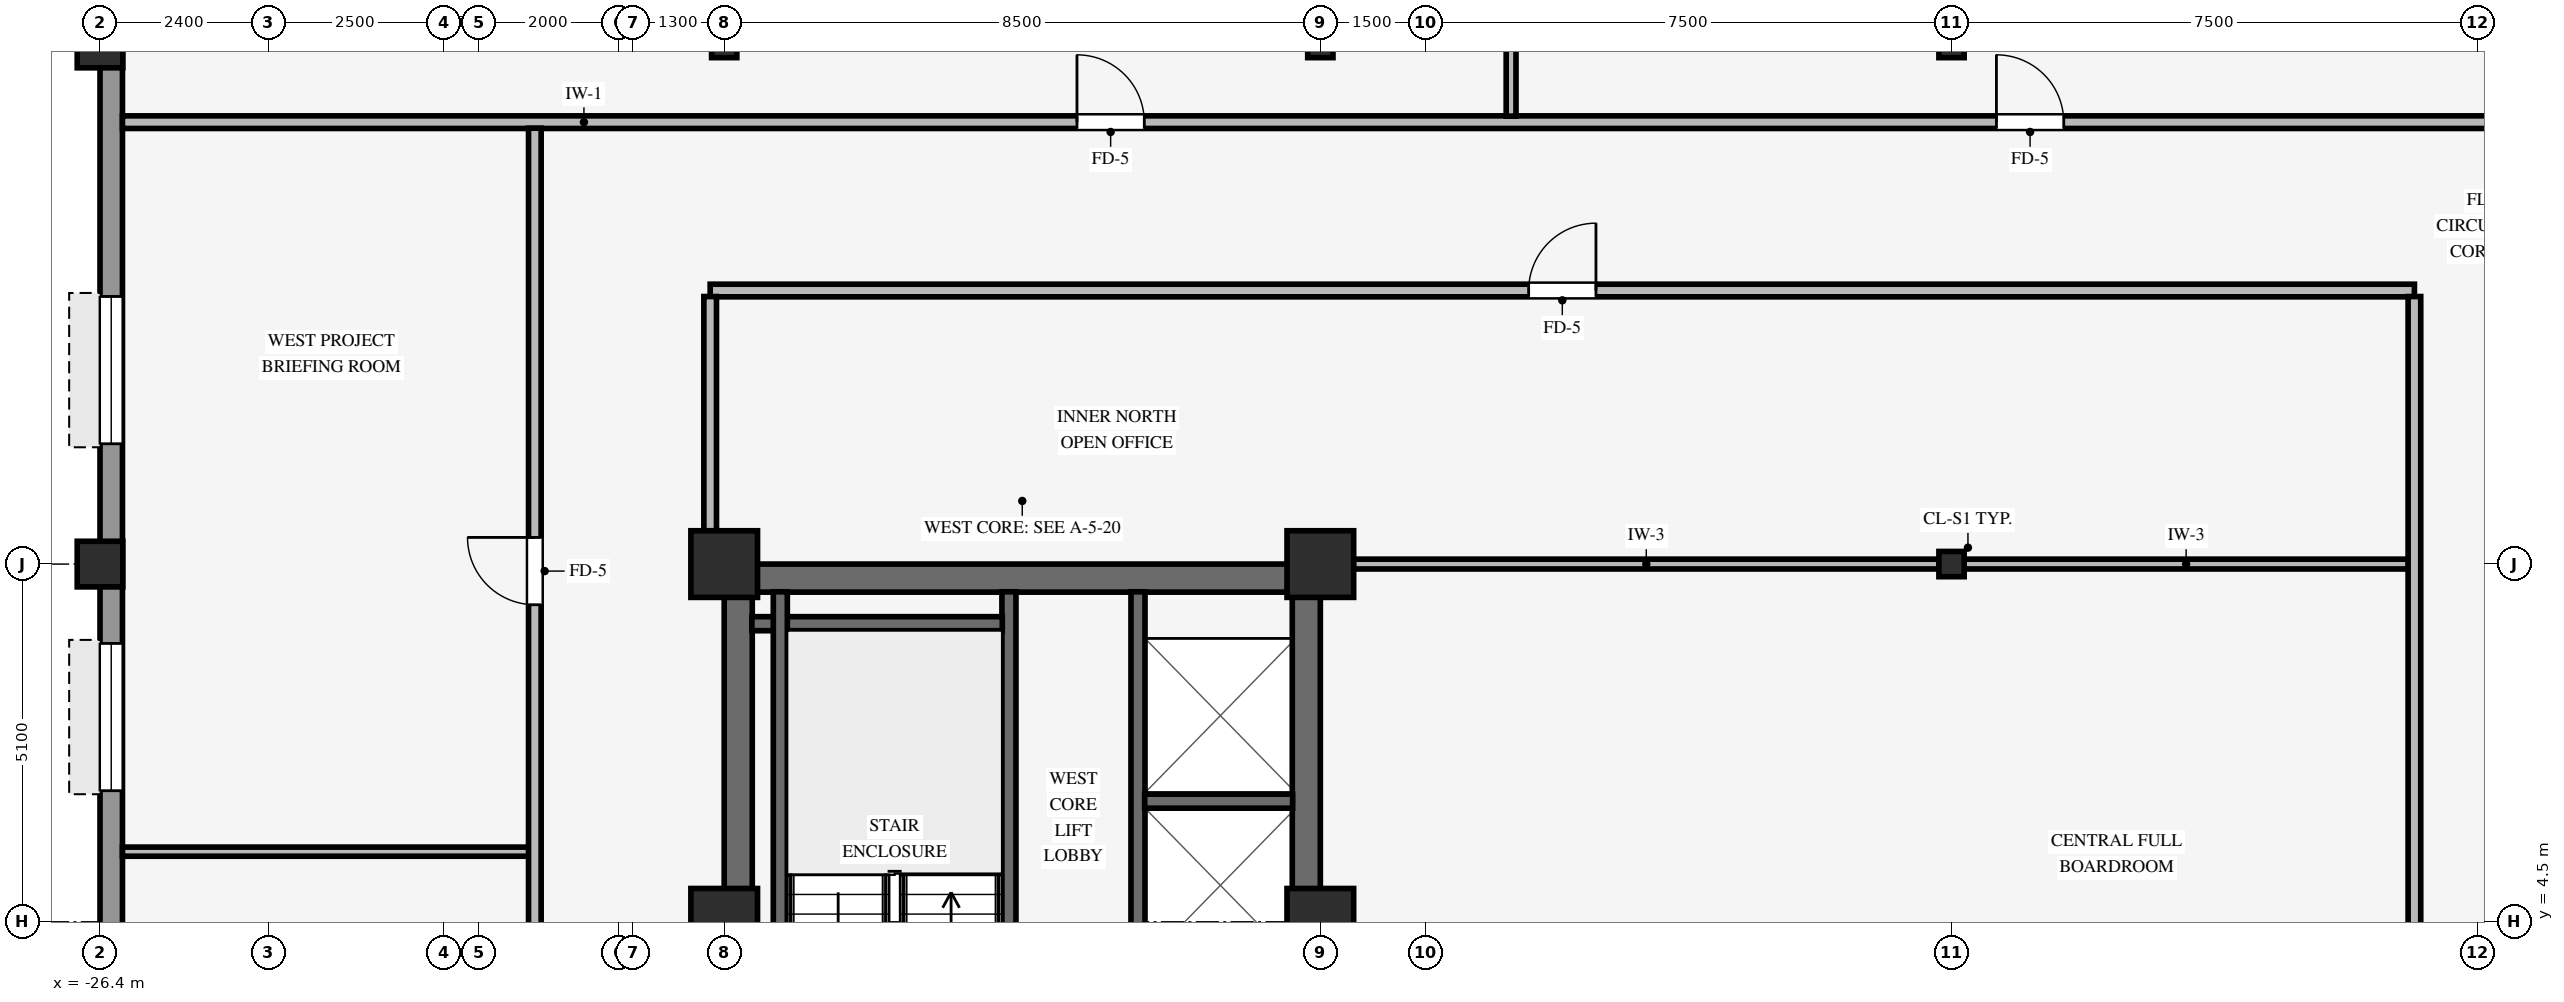
"""IFC4 building model, lengths in metres.
Left out: names, types, materials, properties, quantities, classifications, styles, units other than length and angle.
Written with IfcOpenShell. Run it as: python <this file> out.ifc"""

import sys

from ifc_helpers import new_model, si_unit, direction, frame, frame_2d, origin, origin_2d, place, context, subcontext, project, spatial, rectangle, hollow_rectangle, i_section, extrude, source, transform, mapped, element, fill, save


model = new_model("IFC4")
c1 = context("Model", 3, precision=1e-05, world=origin(), true_north=direction((0.0, 1.0)))
c2 = subcontext(c1, "Body", "Model", "MODEL_VIEW")
j1 = project(units=[si_unit("LENGTHUNIT", "METRE"), si_unit("PLANEANGLEUNIT", "RADIAN")], contexts=[c1])
p1 = place(None, origin())
s1 = spatial("IfcSite", under=j1, at=p1, CompositionType="ELEMENT")
p2 = place(p1, origin())
s2 = spatial("IfcBuilding", under=s1, at=p2, CompositionType="ELEMENT")
p3 = place(p2, frame((0.0, 0.0, 153.05)))
s3 = spatial("IfcBuildingStorey", under=s2, at=p3, CompositionType="ELEMENT", Elevation=153.05)
p4 = place(p3, frame((-17.5, 9.4, 0.0), z_axis=(0.0, 0.0, 1.0), x_axis=(1.0, 0.0, 0.0)))
e1 = element("IfcWall", 1, at=p4, inside=s3, PredefinedType="SHEAR", context=c2, shape_type="SweptSolid", body=[
    extrude(rectangle(XDim=8.5, YDim=0.4, at=frame_2d((4.25, 0.0))), origin(), (0.0, 0.0, 1.0), 3.37),
])
p5 = place(p3, frame((-17.3, -9.205, 0.0), z_axis=(0.0, 0.0, 1.0), x_axis=(0.0, 1.0, 0.0)))
e2 = element("IfcWall", 2, at=p5, inside=s3, PredefinedType="SHEAR", context=c2, shape_type="SweptSolid", body=[
    extrude(rectangle(XDim=18.41, YDim=0.4, at=frame_2d((9.205, 0.0))), origin(), (0.0, 0.0, 1.0), 3.37),
])
p6 = place(p3, frame((-9.2, -9.205, 0.0), z_axis=(0.0, 0.0, 1.0), x_axis=(0.0, 1.0, 0.0)))
e3 = element("IfcWall", 3, at=p6, inside=s3, PredefinedType="SHEAR", context=c2, shape_type="SweptSolid", body=[
    extrude(rectangle(XDim=18.41, YDim=0.4, at=frame_2d((9.205, 0.0))), origin(), (0.0, 0.0, 1.0), 3.37),
])
p7 = place(p6, frame((8.605, 0.0, 0.0)))
e4 = element("IfcOpeningElement", 4, at=p7, cuts=e3, PredefinedType="OPENING", context=c2, shape_type="SweptSolid", body=[
    extrude(rectangle(XDim=1.2, YDim=2.15, at=frame_2d((0.6, 1.075))), frame((0.0, 0.21, 0.0), z_axis=(0.0, -1.0, 0.0), x_axis=(1.0, 0.0, 0.0)), (0.0, 0.0, 1.0), 0.42),
])
for number, where, z_axis, x_axis in (
    (5, (-17.5, 4.5, 0.0), (0.0, 0.0, 1.0), (1.0, 0.0, 0.0)),
    (6, (-17.5, 9.6, 0.0), (0.0, 0.0, 1.0), (1.0, 0.0, 0.0)),
    (7, (-9.0, 4.5, 0.0), (0.0, 0.0, 1.0), (1.0, 0.0, 0.0)),
    (8, (-9.0, 9.6, 0.0), (0.0, 0.0, 1.0), (1.0, 0.0, 0.0)),
):
    element("IfcColumn", number, at=place(p3, frame(where, z_axis=z_axis, x_axis=x_axis)), inside=s3, PredefinedType="COLUMN", context=c2, shape_type="SweptSolid", body=[
        extrude(rectangle(XDim=0.95, YDim=0.95, at=origin_2d()), origin(), (0.0, 0.0, 1.0), 3.37),
    ])
for number, where, z_axis, x_axis in (
    (9, (-26.4, 9.6, 0.0), (0.0, 0.0, 1.0), (1.0, 0.0, 0.0)),
    (10, (-26.4, 17.0, 0.0), (0.0, 0.0, 1.0), (1.0, 0.0, 0.0)),
):
    element("IfcColumn", number, at=place(p3, frame(where, z_axis=z_axis, x_axis=x_axis)), inside=s3, PredefinedType="COLUMN", context=c2, shape_type="SweptSolid", body=[
        extrude(hollow_rectangle(XDim=0.65, YDim=0.65, WallThickness=0.04, InnerFilletRadius=0.04, OuterFilletRadius=0.08, at=origin_2d()), origin(), (0.0, 0.0, 1.0), 3.37),
    ])
for number, where, z_axis, x_axis in (
    (11, (0.0, 9.6, 0.0), (0.0, 0.0, 1.0), (1.0, 0.0, 0.0)),
    (12, (0.0, 17.0, 0.0), (0.0, 0.0, 1.0), (1.0, 0.0, 0.0)),
    (13, (-17.5, 17.0, 0.0), (0.0, 0.0, 1.0), (1.0, 0.0, 0.0)),
    (14, (-9.0, 17.0, 0.0), (0.0, 0.0, 1.0), (1.0, 0.0, 0.0)),
):
    element("IfcColumn", number, at=place(p3, frame(where, z_axis=z_axis, x_axis=x_axis)), inside=s3, PredefinedType="COLUMN", context=c2, shape_type="SweptSolid", body=[
        extrude(i_section(OverallWidth=0.36, OverallDepth=0.36, WebThickness=0.021, FlangeThickness=0.021, FilletRadius=0.018, at=origin_2d()), origin(), (0.0, 0.0, 1.0), 3.37),
    ])
p8 = place(p3, frame((-26.24, -20.784, 0.0), z_axis=(0.0, 0.0, 1.0), x_axis=(0.0, 1.0, 0.0)))
e15 = element("IfcWall", 15, at=p8, inside=s3, PredefinedType="STANDARD", context=c2, shape_type="SweptSolid", body=[
    extrude(rectangle(XDim=41.568, YDim=0.32, at=frame_2d((20.784, 0.0))), origin(), (0.0, 0.0, 1.0), 2.705),
])
p9 = place(p8, frame((7.369, 0.0, 0.8)))
e16 = element("IfcOpeningElement", 16, at=p9, cuts=e15, PredefinedType="OPENING", context=c2, shape_type="SweptSolid", body=[
    extrude(rectangle(XDim=2.1, YDim=1.56, at=frame_2d((1.05, 0.78))), frame((0.0, 0.17, 0.0), z_axis=(0.0, -1.0, 0.0), x_axis=(1.0, 0.0, 0.0)), (0.0, 0.0, 1.0), 0.34),
])
p10 = place(p8, frame((12.315, 0.0, 0.8)))
e17 = element("IfcOpeningElement", 17, at=p10, cuts=e15, PredefinedType="OPENING", context=c2, shape_type="SweptSolid", body=[
    extrude(rectangle(XDim=2.1, YDim=1.56, at=frame_2d((1.05, 0.78))), frame((0.0, 0.17, 0.0), z_axis=(0.0, -1.0, 0.0), x_axis=(1.0, 0.0, 0.0)), (0.0, 0.0, 1.0), 0.34),
])
p11 = place(p8, frame((17.261, 0.0, 0.8)))
e18 = element("IfcOpeningElement", 18, at=p11, cuts=e15, PredefinedType="OPENING", context=c2, shape_type="SweptSolid", body=[
    extrude(rectangle(XDim=2.1, YDim=1.56, at=frame_2d((1.05, 0.78))), frame((0.0, 0.17, 0.0), z_axis=(0.0, -1.0, 0.0), x_axis=(1.0, 0.0, 0.0)), (0.0, 0.0, 1.0), 0.34),
])
p12 = place(p8, frame((22.207, 0.0, 0.8)))
e19 = element("IfcOpeningElement", 19, at=p12, cuts=e15, PredefinedType="OPENING", context=c2, shape_type="SweptSolid", body=[
    extrude(rectangle(XDim=2.1, YDim=1.56, at=frame_2d((1.05, 0.78))), frame((0.0, 0.17, 0.0), z_axis=(0.0, -1.0, 0.0), x_axis=(1.0, 0.0, 0.0)), (0.0, 0.0, 1.0), 0.34),
])
p13 = place(p8, frame((27.153, 0.0, 0.8)))
e20 = element("IfcOpeningElement", 20, at=p13, cuts=e15, PredefinedType="OPENING", context=c2, shape_type="SweptSolid", body=[
    extrude(rectangle(XDim=2.1, YDim=1.56, at=frame_2d((1.05, 0.78))), frame((0.0, 0.17, 0.0), z_axis=(0.0, -1.0, 0.0), x_axis=(1.0, 0.0, 0.0)), (0.0, 0.0, 1.0), 0.34),
])
p14 = place(p8, frame((32.099, 0.0, 0.8)))
e21 = element("IfcOpeningElement", 21, at=p14, cuts=e15, PredefinedType="OPENING", context=c2, shape_type="SweptSolid", body=[
    extrude(rectangle(XDim=2.1, YDim=1.56, at=frame_2d((1.05, 0.78))), frame((0.0, 0.17, 0.0), z_axis=(0.0, -1.0, 0.0), x_axis=(1.0, 0.0, 0.0)), (0.0, 0.0, 1.0), 0.34),
])
p15 = place(p3, frame((-13.44, 0.9, 0.0), z_axis=(0.0, 0.0, 1.0), x_axis=(0.0, 1.0, 0.0)))
e22 = element("IfcWall", 22, at=p15, inside=s3, PredefinedType="SHEAR", context=c2, shape_type="SweptSolid", body=[
    extrude(rectangle(XDim=8.305, YDim=0.2, at=frame_2d((4.153, 0.0))), origin(), (0.0, 0.0, 1.0), 3.37),
])
p16 = place(p15, frame((1.53, 0.0, 0.0), z_axis=(0.0, 0.0, 1.0), x_axis=(-1.0, 0.0, 0.0)))
e23 = element("IfcOpeningElement", 23, at=p16, cuts=e22, PredefinedType="OPENING", context=c2, shape_type="SweptSolid", body=[
    extrude(rectangle(XDim=1.1, YDim=2.15, at=frame_2d((0.55, 1.075))), frame((0.0, 0.11, 0.0), z_axis=(0.0, -1.0, 0.0), x_axis=(1.0, 0.0, 0.0)), (0.0, 0.0, 1.0), 0.22),
])
p17 = place(p3, frame((-17.105, 8.75, 0.0), z_axis=(0.0, 0.0, 1.0), x_axis=(1.0, 0.0, 0.0)))
e24 = element("IfcWall", 24, at=p17, inside=s3, PredefinedType="SHEAR", context=c2, shape_type="SweptSolid", body=[
    extrude(rectangle(XDim=3.57, YDim=0.2, at=frame_2d((1.785, 0.0))), origin(), (0.0, 0.0, 1.0), 3.37),
])
p18 = place(p3, frame((-16.7, 1.095, 0.0), z_axis=(0.0, 0.0, 1.0), x_axis=(0.0, 1.0, 0.0)))
e25 = element("IfcWall", 25, at=p18, inside=s3, PredefinedType="SHEAR", context=c2, shape_type="SweptSolid", body=[
    extrude(rectangle(XDim=8.11, YDim=0.2, at=frame_2d((4.055, 0.0))), origin(), (0.0, 0.0, 1.0), 3.37),
])
p19 = place(p3, frame((-11.6, 1.3, 0.0), z_axis=(0.0, 0.0, 1.0), x_axis=(0.0, 1.0, 0.0)))
e26 = element("IfcWall", 26, at=p19, inside=s3, PredefinedType="SHEAR", context=c2, shape_type="SweptSolid", body=[
    extrude(rectangle(XDim=7.905, YDim=0.2, at=frame_2d((3.953, 0.0))), origin(), (0.0, 0.0, 1.0), 3.37),
])
p20 = place(p3, frame((-11.505, 6.22, 0.0), z_axis=(0.0, 0.0, 1.0), x_axis=(1.0, 0.0, 0.0)))
e27 = element("IfcWall", 27, at=p20, inside=s3, PredefinedType="SHEAR", context=c2, shape_type="SweptSolid", body=[
    extrude(rectangle(XDim=2.11, YDim=0.2, at=frame_2d((1.055, 0.0))), origin(), (0.0, 0.0, 1.0), 3.37),
])
p21 = place(p3, frame((-26.08, 5.5, 0.0), z_axis=(0.0, 0.0, 1.0), x_axis=(1.0, 0.0, 0.0)))
e28 = element("IfcWall", 28, at=p21, inside=s3, PredefinedType="PARTITIONING", context=c2, shape_type="SweptSolid", body=[
    extrude(rectangle(XDim=5.794, YDim=0.13, at=frame_2d((2.897, 0.0))), origin(), (0.0, 0.0, 1.0), 3.36),
])
p22 = place(p3, frame((-8.529, 9.6, 0.0), z_axis=(0.0, 0.0, 1.0), x_axis=(1.0, 0.0, 0.0)))
e29 = element("IfcWall", 29, at=p22, inside=s3, PredefinedType="PARTITIONING", context=c2, shape_type="SweptSolid", body=[
    extrude(rectangle(XDim=8.353, YDim=0.14, at=frame_2d((4.177, 0.0))), origin(), (0.0, 0.0, 1.0), 2.405),
])
p23 = place(p3, frame((0.176, 9.6, 0.0), z_axis=(0.0, 0.0, 1.0), x_axis=(1.0, 0.0, 0.0)))
e30 = element("IfcWall", 30, at=p23, inside=s3, PredefinedType="PARTITIONING", context=c2, shape_type="SweptSolid", body=[
    extrude(rectangle(XDim=6.338, YDim=0.14, at=frame_2d((3.169, 0.0))), origin(), (0.0, 0.0, 1.0), 2.405),
])
p24 = place(p3, frame((-17.7, 13.5, 0.0), z_axis=(0.0, 0.0, 1.0), x_axis=(1.0, 0.0, 0.0)))
e31 = element("IfcWall", 31, at=p24, inside=s3, PredefinedType="PARTITIONING", context=c2, shape_type="SweptSolid", body=[
    extrude(rectangle(XDim=24.3, YDim=0.18, at=frame_2d((12.15, 0.0))), origin(), (0.0, 0.0, 1.0), 2.998),
])
p25 = place(p24, frame((11.67, 0.0, 0.0)))
e32 = element("IfcOpeningElement", 32, at=p25, cuts=e31, PredefinedType="OPENING", context=c2, shape_type="SweptSolid", body=[
    extrude(rectangle(XDim=0.96, YDim=2.1, at=frame_2d((0.48, 1.05))), frame((0.0, 0.1, 0.0), z_axis=(0.0, -1.0, 0.0), x_axis=(1.0, 0.0, 0.0)), (0.0, 0.0, 1.0), 0.2),
])
p26 = place(p3, frame((-26.08, 15.9, 0.0), z_axis=(0.0, 0.0, 1.0), x_axis=(1.0, 0.0, 0.0)))
e33 = element("IfcWall", 33, at=p26, inside=s3, PredefinedType="PARTITIONING", context=c2, shape_type="SweptSolid", body=[
    extrude(rectangle(XDim=52.16, YDim=0.18, at=frame_2d((26.08, 0.0))), origin(), (0.0, 0.0, 1.0), 3.36),
])
p27 = place(p26, frame((26.72, 0.0, 0.0)))
e34 = element("IfcOpeningElement", 34, at=p27, cuts=e33, PredefinedType="OPENING", context=c2, shape_type="SweptSolid", body=[
    extrude(rectangle(XDim=0.96, YDim=2.1, at=frame_2d((0.48, 1.05))), frame((0.0, 0.1, 0.0), z_axis=(0.0, -1.0, 0.0), x_axis=(1.0, 0.0, 0.0)), (0.0, 0.0, 1.0), 0.2),
])
p28 = place(p26, frame((40.5, 0.0, 0.0)))
e35 = element("IfcOpeningElement", 35, at=p28, cuts=e33, PredefinedType="OPENING", context=c2, shape_type="SweptSolid", body=[
    extrude(rectangle(XDim=0.96, YDim=2.1, at=frame_2d((0.48, 1.05))), frame((0.0, 0.1, 0.0), z_axis=(0.0, -1.0, 0.0), x_axis=(1.0, 0.0, 0.0)), (0.0, 0.0, 1.0), 0.2),
])
p29 = place(p26, frame((13.61, 0.0, 0.0)))
e36 = element("IfcOpeningElement", 36, at=p29, cuts=e33, PredefinedType="OPENING", context=c2, shape_type="SweptSolid", body=[
    extrude(rectangle(XDim=0.96, YDim=2.1, at=frame_2d((0.48, 1.05))), frame((0.0, 0.1, 0.0), z_axis=(0.0, -1.0, 0.0), x_axis=(1.0, 0.0, 0.0)), (0.0, 0.0, 1.0), 0.2),
])
p30 = place(p3, frame((-20.2, -15.814, 0.0), z_axis=(0.0, 0.0, 1.0), x_axis=(0.0, 1.0, 0.0)))
e37 = element("IfcWall", 37, at=p30, inside=s3, PredefinedType="PARTITIONING", context=c2, shape_type="SweptSolid", body=[
    extrude(rectangle(XDim=31.628, YDim=0.18, at=frame_2d((15.814, 0.0))), origin(), (0.0, 0.0, 1.0), 3.36),
])
p31 = place(p30, frame((15.334, 0.0, 0.0)))
e38 = element("IfcOpeningElement", 38, at=p31, cuts=e37, PredefinedType="OPENING", context=c2, shape_type="SweptSolid", body=[
    extrude(rectangle(XDim=0.96, YDim=2.1, at=frame_2d((0.48, 1.05))), frame((0.0, 0.1, 0.0), z_axis=(0.0, -1.0, 0.0), x_axis=(1.0, 0.0, 0.0)), (0.0, 0.0, 1.0), 0.2),
])
p32 = place(p30, frame((5.834, 0.0, 0.0)))
e39 = element("IfcOpeningElement", 39, at=p32, cuts=e37, PredefinedType="OPENING", context=c2, shape_type="SweptSolid", body=[
    extrude(rectangle(XDim=0.96, YDim=2.1, at=frame_2d((0.48, 1.05))), frame((0.0, 0.1, 0.0), z_axis=(0.0, -1.0, 0.0), x_axis=(1.0, 0.0, 0.0)), (0.0, 0.0, 1.0), 0.2),
])
p33 = place(p30, frame((24.834, 0.0, 0.0)))
e40 = element("IfcOpeningElement", 40, at=p33, cuts=e37, PredefinedType="OPENING", context=c2, shape_type="SweptSolid", body=[
    extrude(rectangle(XDim=0.96, YDim=2.1, at=frame_2d((0.48, 1.05))), frame((0.0, 0.1, 0.0), z_axis=(0.0, -1.0, 0.0), x_axis=(1.0, 0.0, 0.0)), (0.0, 0.0, 1.0), 0.2),
])
p34 = place(p3, frame((-17.7, 10.071, 0.0), z_axis=(0.0, 0.0, 1.0), x_axis=(0.0, 1.0, 0.0)))
e41 = element("IfcWall", 41, at=p34, inside=s3, PredefinedType="PARTITIONING", context=c2, shape_type="SweptSolid", body=[
    extrude(rectangle(XDim=3.343, YDim=0.18, at=frame_2d((1.671, 0.0))), origin(), (0.0, 0.0, 1.0), 2.816),
])
p35 = place(p3, frame((-6.28, 15.986, 0.0), z_axis=(0.0, 0.0, 1.0), x_axis=(0.0, 1.0, 0.0)))
e42 = element("IfcWall", 42, at=p35, inside=s3, PredefinedType="PARTITIONING", context=c2, shape_type="SweptSolid", body=[
    extrude(rectangle(XDim=6.894, YDim=0.14, at=frame_2d((3.447, 0.0))), origin(), (0.0, 0.0, 1.0), 3.36),
])
p36 = place(p3, frame((6.6, 1.336, 0.0), z_axis=(0.0, 0.0, 1.0), x_axis=(0.0, 1.0, 0.0)))
e43 = element("IfcWall", 43, at=p36, inside=s3, PredefinedType="PARTITIONING", context=c2, shape_type="SweptSolid", body=[
    extrude(rectangle(XDim=12.078, YDim=0.18, at=frame_2d((6.039, 0.0))), origin(), (0.0, 0.0, 1.0), 3.36),
])
m1 = source(origin(), c2, "Body", "SweptSolid", [
    extrude(rectangle(XDim=2.1, YDim=1.56, at=frame_2d((1.05, 0.78))), frame((0.0, 0.03, 0.0), z_axis=(0.0, -1.0, 0.0), x_axis=(1.0, 0.0, 0.0)), (0.0, 0.0, 1.0), 0.06),
])
p37 = place(p13, origin())
e44 = element("IfcWindow", 44, at=p37, inside=s3, PartitioningType="SINGLE_PANEL", PredefinedType="WINDOW", context=c2, shape_type="MappedRepresentation", body=[
    mapped(m1, transform((0.0, 0.0, 0.0), scale=1.0)),
])
fill(e20, e44)
p38 = place(p14, origin())
e45 = element("IfcWindow", 45, at=p38, inside=s3, PartitioningType="SINGLE_PANEL", PredefinedType="WINDOW", context=c2, shape_type="MappedRepresentation", body=[
    mapped(m1, transform((0.0, 0.0, 0.0), scale=1.0)),
])
fill(e21, e45)
m2 = source(origin(), c2, "Body", "SweptSolid", [
    extrude(rectangle(XDim=0.96, YDim=2.1, at=frame_2d((0.48, 1.05))), frame((0.0, 0.025, 0.0), z_axis=(0.0, -1.0, 0.0), x_axis=(1.0, 0.0, 0.0)), (0.0, 0.0, 1.0), 0.05),
])
p39 = place(p25, origin())
e46 = element("IfcDoor", 46, at=p39, inside=s3, OperationType="SINGLE_SWING_RIGHT", PredefinedType="DOOR", context=c2, shape_type="MappedRepresentation", body=[
    mapped(m2, transform((0.0, 0.0, 0.0), scale=1.0)),
])
fill(e32, e46)
p40 = place(p27, origin())
e47 = element("IfcDoor", 47, at=p40, inside=s3, OperationType="SINGLE_SWING_LEFT", PredefinedType="DOOR", context=c2, shape_type="MappedRepresentation", body=[
    mapped(m2, transform((0.0, 0.0, 0.0), scale=1.0)),
])
fill(e34, e47)
p41 = place(p29, origin())
e48 = element("IfcDoor", 48, at=p41, inside=s3, OperationType="SINGLE_SWING_LEFT", PredefinedType="DOOR", context=c2, shape_type="MappedRepresentation", body=[
    mapped(m2, transform((0.0, 0.0, 0.0), scale=1.0)),
])
fill(e36, e48)
p42 = place(p33, origin())
e49 = element("IfcDoor", 49, at=p42, inside=s3, OperationType="SINGLE_SWING_RIGHT", PredefinedType="DOOR", context=c2, shape_type="MappedRepresentation", body=[
    mapped(m2, transform((0.0, 0.0, 0.0), scale=1.0)),
])
fill(e40, e49)
save(model, sys.argv[1])
